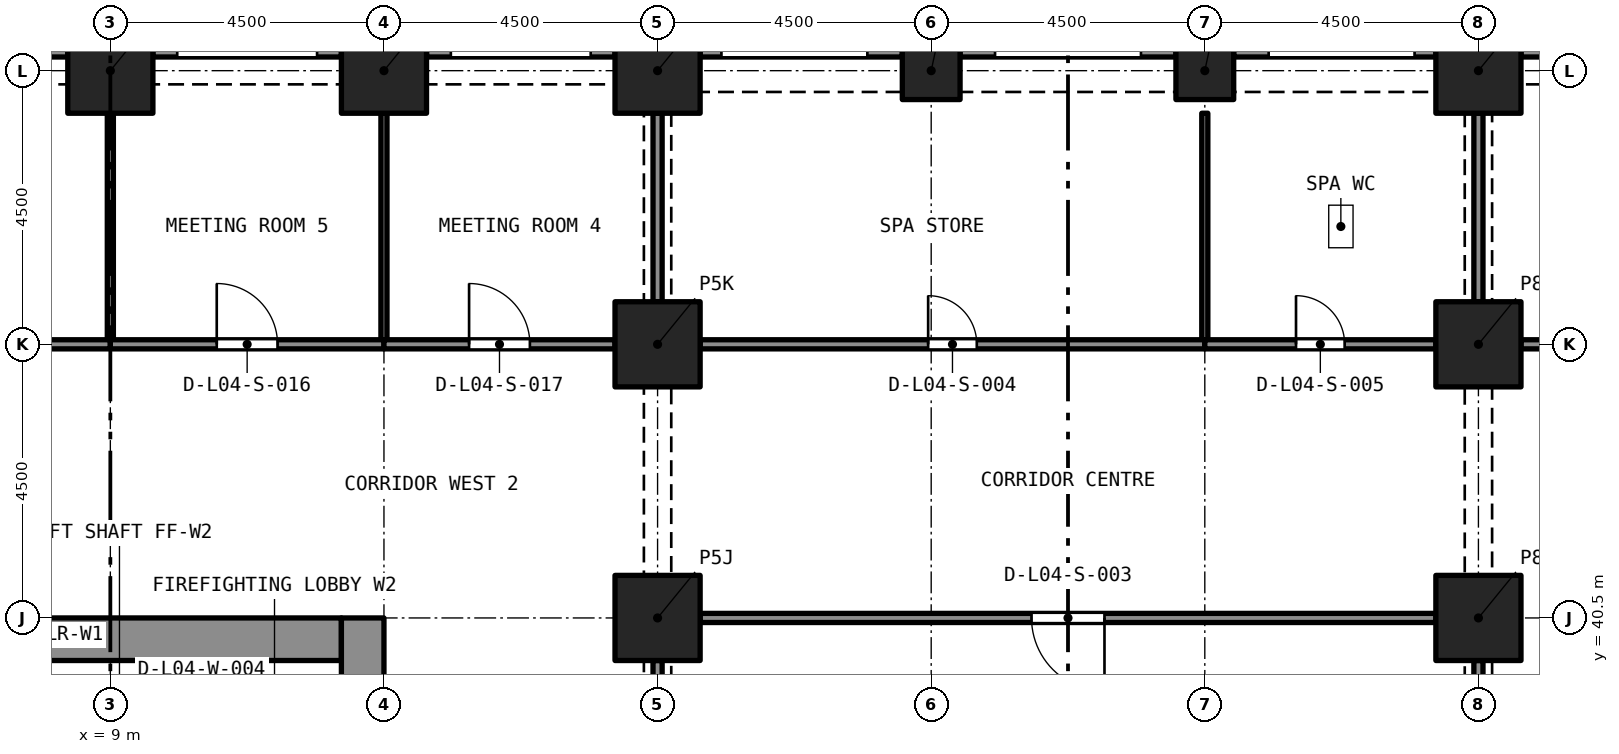
"""IFC4 building model, lengths in metres.
Left out: names, types, materials, properties, quantities, classifications, styles, units other than length and angle.
Written with IfcOpenShell. Run it as: python <this file> out.ifc"""

import sys

from ifc_helpers import new_model, si_unit, direction, frame, frame_2d, origin, origin_2d, place, context, subcontext, project, spatial, rectangle, extrude, element, fill, save


model = new_model("IFC4")
c1 = context("Model", 3, precision=1e-05, world=origin(), true_north=direction((0.0, 1.0)))
c2 = subcontext(c1, "Body", "Model", "MODEL_VIEW")
j1 = project(units=[si_unit("LENGTHUNIT", "METRE"), si_unit("PLANEANGLEUNIT", "RADIAN")], contexts=[c1])
p1 = place(None, origin())
s1 = spatial("IfcSite", under=j1, at=p1, CompositionType="ELEMENT")
p2 = place(p1, origin())
s2 = spatial("IfcBuilding", under=s1, at=p2, CompositionType="ELEMENT")
p3 = place(p2, frame((0.0, 0.0, 21.0)))
s3 = spatial("IfcBuildingStorey", under=s2, at=p3, CompositionType="ELEMENT", Elevation=21.0)
for number, where, z_axis, x_axis in (
    (1, (18.0, 40.5, 0.0), (0.0, 0.0, 1.0), (1.0, 0.0, 0.0)),
    (2, (31.5, 40.5, 0.0), (0.0, 0.0, 1.0), (1.0, 0.0, 0.0)),
    (3, (18.0, 45.0, 0.0), (0.0, 0.0, 1.0), (1.0, 0.0, 0.0)),
    (4, (31.5, 45.0, 0.0), (0.0, 0.0, 1.0), (1.0, 0.0, 0.0)),
    (5, (9.0, 49.5, 0.0), (0.0, 0.0, 1.0), (1.0, 0.0, 0.0)),
    (6, (13.5, 49.5, 0.0), (0.0, 0.0, 1.0), (1.0, 0.0, 0.0)),
    (7, (18.0, 49.5, 0.0), (0.0, 0.0, 1.0), (1.0, 0.0, 0.0)),
):
    element("IfcColumn", number, at=place(p3, frame(where, z_axis=z_axis, x_axis=x_axis)), inside=s3, PredefinedType="COLUMN", context=c2, shape_type="SweptSolid", body=[
        extrude(rectangle(XDim=1.4, YDim=1.4, at=origin_2d()), origin(), (0.0, 0.0, 1.0), 5.0),
    ])
for number, where, z_axis, x_axis in (
    (8, (22.5, 49.5, 0.0), (0.0, 0.0, 1.0), (1.0, 0.0, 0.0)),
    (9, (27.0, 49.5, 0.0), (0.0, 0.0, 1.0), (1.0, 0.0, 0.0)),
):
    element("IfcColumn", number, at=place(p3, frame(where, z_axis=z_axis, x_axis=x_axis)), inside=s3, PredefinedType="COLUMN", context=c2, shape_type="SweptSolid", body=[
        extrude(rectangle(XDim=0.95, YDim=0.95, at=origin_2d()), origin(), (0.0, 0.0, 1.0), 5.0),
    ])
p4 = place(p3, frame((31.5, 49.5, 0.0), z_axis=(0.0, 0.0, 1.0), x_axis=(1.0, 0.0, 0.0)))
e10 = element("IfcColumn", 10, at=p4, inside=s3, PredefinedType="COLUMN", context=c2, shape_type="SweptSolid", body=[
    extrude(rectangle(XDim=1.4, YDim=1.4, at=origin_2d()), origin(), (0.0, 0.0, 1.0), 5.0),
])
p5 = place(p3, frame((5.2, 40.15, 0.0), z_axis=(0.0, 0.0, 1.0), x_axis=(1.0, 0.0, 0.0)))
e11 = element("IfcWall", 11, at=p5, inside=s3, PredefinedType="SOLIDWALL", context=c2, shape_type="SweptSolid", body=[
    extrude(rectangle(XDim=7.6, YDim=0.7, at=frame_2d((3.8, 0.0))), origin(), (0.0, 0.0, 1.0), 5.0),
])
p6 = place(p3, frame((13.15, 27.0, 0.0), z_axis=(0.0, 0.0, 1.0), x_axis=(0.0, 1.0, 0.0)))
e12 = element("IfcWall", 12, at=p6, inside=s3, PredefinedType="SOLIDWALL", context=c2, shape_type="SweptSolid", body=[
    extrude(rectangle(XDim=13.5, YDim=0.7, at=frame_2d((6.75, 0.0))), origin(), (0.0, 0.0, 1.0), 5.0),
])
p7 = place(p6, frame((11.1, 0.0, 0.0)))
e13 = element("IfcOpeningElement", 13, at=p7, cuts=e12, PredefinedType="OPENING", context=c2, shape_type="SweptSolid", body=[
    extrude(rectangle(XDim=1.1, YDim=2.1, at=frame_2d((0.55, 1.05))), frame((0.0, 0.36, 0.0), z_axis=(0.0, -1.0, 0.0), x_axis=(1.0, 0.0, 0.0)), (0.0, 0.0, 1.0), 0.72),
])
p8 = place(p6, frame((8.95, 0.0, 0.0)))
e14 = element("IfcOpeningElement", 14, at=p8, cuts=e12, PredefinedType="OPENING", context=c2, shape_type="SweptSolid", body=[
    extrude(rectangle(XDim=1.2, YDim=2.1, at=frame_2d((0.6, 1.05))), frame((0.0, 0.36, 0.0), z_axis=(0.0, -1.0, 0.0), x_axis=(1.0, 0.0, 0.0)), (0.0, 0.0, 1.0), 0.72),
])
p9 = place(p3, frame((32.2, 49.875, 0.0), z_axis=(0.0, 0.0, 1.0), x_axis=(1.0, 0.0, 0.0)))
e15 = element("IfcWall", 15, at=p9, inside=s3, PredefinedType="SOLIDWALL", context=c2, shape_type="SweptSolid", body=[
    extrude(rectangle(XDim=3.1, YDim=0.3, at=frame_2d((1.55, 0.0))), origin(), (0.0, 0.0, 1.0), 5.0),
])
p10 = place(p9, frame((0.4, 0.0, 0.45)))
e16 = element("IfcOpeningElement", 16, at=p10, cuts=e15, PredefinedType="OPENING", context=c2, shape_type="SweptSolid", body=[
    extrude(rectangle(XDim=2.3, YDim=3.3, at=frame_2d((1.15, 1.65))), frame((0.0, 0.16, 0.0), z_axis=(0.0, -1.0, 0.0), x_axis=(1.0, 0.0, 0.0)), (0.0, 0.0, 1.0), 0.32),
])
p11 = place(p3, frame((27.475, 49.875, 0.0), z_axis=(0.0, 0.0, 1.0), x_axis=(1.0, 0.0, 0.0)))
e17 = element("IfcWall", 17, at=p11, inside=s3, PredefinedType="SOLIDWALL", context=c2, shape_type="SweptSolid", body=[
    extrude(rectangle(XDim=3.325, YDim=0.3, at=frame_2d((1.663, 0.0))), origin(), (0.0, 0.0, 1.0), 5.0),
])
p12 = place(p11, frame((0.575, 0.0, 0.45)))
e18 = element("IfcOpeningElement", 18, at=p12, cuts=e17, PredefinedType="OPENING", context=c2, shape_type="SweptSolid", body=[
    extrude(rectangle(XDim=2.4, YDim=3.3, at=frame_2d((1.2, 1.65))), frame((0.0, 0.16, 0.0), z_axis=(0.0, -1.0, 0.0), x_axis=(1.0, 0.0, 0.0)), (0.0, 0.0, 1.0), 0.32),
])
p13 = place(p3, frame((22.975, 49.875, 0.0), z_axis=(0.0, 0.0, 1.0), x_axis=(1.0, 0.0, 0.0)))
e19 = element("IfcWall", 19, at=p13, inside=s3, PredefinedType="SOLIDWALL", context=c2, shape_type="SweptSolid", body=[
    extrude(rectangle(XDim=3.55, YDim=0.3, at=frame_2d((1.775, 0.0))), origin(), (0.0, 0.0, 1.0), 5.0),
])
p14 = place(p13, frame((0.575, 0.0, 0.45)))
e20 = element("IfcOpeningElement", 20, at=p14, cuts=e19, PredefinedType="OPENING", context=c2, shape_type="SweptSolid", body=[
    extrude(rectangle(XDim=2.4, YDim=3.3, at=frame_2d((1.2, 1.65))), frame((0.0, 0.16, 0.0), z_axis=(0.0, -1.0, 0.0), x_axis=(1.0, 0.0, 0.0)), (0.0, 0.0, 1.0), 0.32),
])
p15 = place(p3, frame((18.7, 49.875, 0.0), z_axis=(0.0, 0.0, 1.0), x_axis=(1.0, 0.0, 0.0)))
e21 = element("IfcWall", 21, at=p15, inside=s3, PredefinedType="SOLIDWALL", context=c2, shape_type="SweptSolid", body=[
    extrude(rectangle(XDim=3.325, YDim=0.3, at=frame_2d((1.663, 0.0))), origin(), (0.0, 0.0, 1.0), 5.0),
])
p16 = place(p15, frame((0.35, 0.0, 0.45)))
e22 = element("IfcOpeningElement", 22, at=p16, cuts=e21, PredefinedType="OPENING", context=c2, shape_type="SweptSolid", body=[
    extrude(rectangle(XDim=2.4, YDim=3.3, at=frame_2d((1.2, 1.65))), frame((0.0, 0.16, 0.0), z_axis=(0.0, -1.0, 0.0), x_axis=(1.0, 0.0, 0.0)), (0.0, 0.0, 1.0), 0.32),
])
p17 = place(p3, frame((14.2, 49.875, 0.0), z_axis=(0.0, 0.0, 1.0), x_axis=(1.0, 0.0, 0.0)))
e23 = element("IfcWall", 23, at=p17, inside=s3, PredefinedType="SOLIDWALL", context=c2, shape_type="SweptSolid", body=[
    extrude(rectangle(XDim=3.1, YDim=0.3, at=frame_2d((1.55, 0.0))), origin(), (0.0, 0.0, 1.0), 5.0),
])
p18 = place(p17, frame((0.4, 0.0, 0.45)))
e24 = element("IfcOpeningElement", 24, at=p18, cuts=e23, PredefinedType="OPENING", context=c2, shape_type="SweptSolid", body=[
    extrude(rectangle(XDim=2.3, YDim=3.3, at=frame_2d((1.15, 1.65))), frame((0.0, 0.16, 0.0), z_axis=(0.0, -1.0, 0.0), x_axis=(1.0, 0.0, 0.0)), (0.0, 0.0, 1.0), 0.32),
])
p19 = place(p3, frame((9.7, 49.875, 0.0), z_axis=(0.0, 0.0, 1.0), x_axis=(1.0, 0.0, 0.0)))
e25 = element("IfcWall", 25, at=p19, inside=s3, PredefinedType="SOLIDWALL", context=c2, shape_type="SweptSolid", body=[
    extrude(rectangle(XDim=3.1, YDim=0.3, at=frame_2d((1.55, 0.0))), origin(), (0.0, 0.0, 1.0), 5.0),
])
p20 = place(p19, frame((0.4, 0.0, 0.45)))
e26 = element("IfcOpeningElement", 26, at=p20, cuts=e25, PredefinedType="OPENING", context=c2, shape_type="SweptSolid", body=[
    extrude(rectangle(XDim=2.3, YDim=3.3, at=frame_2d((1.15, 1.65))), frame((0.0, 0.16, 0.0), z_axis=(0.0, -1.0, 0.0), x_axis=(1.0, 0.0, 0.0)), (0.0, 0.0, 1.0), 0.32),
])
p21 = place(p3, frame((5.2, 49.875, 0.0), z_axis=(0.0, 0.0, 1.0), x_axis=(1.0, 0.0, 0.0)))
e27 = element("IfcWall", 27, at=p21, inside=s3, PredefinedType="SOLIDWALL", context=c2, shape_type="SweptSolid", body=[
    extrude(rectangle(XDim=3.1, YDim=0.3, at=frame_2d((1.55, 0.0))), origin(), (0.0, 0.0, 1.0), 5.0),
])
p22 = place(p21, frame((0.4, 0.0, 0.45)))
e28 = element("IfcOpeningElement", 28, at=p22, cuts=e27, PredefinedType="OPENING", context=c2, shape_type="SweptSolid", body=[
    extrude(rectangle(XDim=2.3, YDim=3.3, at=frame_2d((1.15, 1.65))), frame((0.0, 0.16, 0.0), z_axis=(0.0, -1.0, 0.0), x_axis=(1.0, 0.0, 0.0)), (0.0, 0.0, 1.0), 0.32),
])
p23 = place(p3, frame((10.5, 37.5, 0.0), z_axis=(0.0, 0.0, 1.0), x_axis=(0.0, 1.0, 0.0)))
e29 = element("IfcWall", 29, at=p23, inside=s3, PredefinedType="SOLIDWALL", context=c2, shape_type="SweptSolid", body=[
    extrude(rectangle(XDim=2.3, YDim=0.175, at=frame_2d((1.15, 0.0))), origin(), (0.0, 0.0, 1.0), 4.65),
])
p24 = place(p23, frame((0.65, 0.0, 0.0)))
e30 = element("IfcOpeningElement", 30, at=p24, cuts=e29, PredefinedType="OPENING", context=c2, shape_type="SweptSolid", body=[
    extrude(rectangle(XDim=1.0, YDim=2.1, at=frame_2d((0.5, 1.05))), frame((0.0, 0.097, 0.0), z_axis=(0.0, -1.0, 0.0), x_axis=(1.0, 0.0, 0.0)), (0.0, 0.0, 1.0), 0.195),
])
p25 = place(p3, frame((30.8, 40.5, 0.0), z_axis=(0.0, 0.0, 1.0), x_axis=(-1.0, 0.0, 0.0)))
e31 = element("IfcWall", 31, at=p25, inside=s3, PredefinedType="PARTITIONING", context=c2, shape_type="SweptSolid", body=[
    extrude(rectangle(XDim=12.1, YDim=0.15, at=frame_2d((6.05, 0.0))), origin(), (0.0, 0.0, 1.0), 4.55),
])
p26 = place(p25, frame((5.45, 0.0, 0.0)))
e32 = element("IfcOpeningElement", 32, at=p26, cuts=e31, PredefinedType="OPENING", context=c2, shape_type="SweptSolid", body=[
    extrude(rectangle(XDim=1.2, YDim=2.1, at=frame_2d((0.6, 1.05))), frame((0.0, 0.085, 0.0), z_axis=(0.0, -1.0, 0.0), x_axis=(1.0, 0.0, 0.0)), (0.0, 0.0, 1.0), 0.17),
])
for number, where, z_axis, x_axis in (
    (33, (31.5, 36.7, 0.0), (0.0, 0.0, 1.0), (0.0, 1.0, 0.0)),
    (34, (18.0, 36.7, 0.0), (0.0, 0.0, 1.0), (0.0, 1.0, 0.0)),
):
    element("IfcWall", number, at=place(p3, frame(where, z_axis=z_axis, x_axis=x_axis)), inside=s3, PredefinedType="PARTITIONING", context=c2, shape_type="SweptSolid", body=[
        extrude(rectangle(XDim=3.1, YDim=0.15, at=frame_2d((1.55, 0.0))), origin(), (0.0, 0.0, 1.0), 4.18),
    ])
p27 = place(p3, frame((27.0, 45.075, 0.0), z_axis=(0.0, 0.0, 1.0), x_axis=(0.0, 1.0, 0.0)))
e35 = element("IfcWall", 35, at=p27, inside=s3, PredefinedType="PARTITIONING", context=c2, shape_type="SweptSolid", body=[
    extrude(rectangle(XDim=3.725, YDim=0.1, at=frame_2d((1.863, 0.0))), origin(), (0.0, 0.0, 1.0), 4.55),
])
p28 = place(p3, frame((18.7, 45.0, 0.0), z_axis=(0.0, 0.0, 1.0), x_axis=(1.0, 0.0, 0.0)))
e36 = element("IfcWall", 36, at=p28, inside=s3, PredefinedType="PARTITIONING", context=c2, shape_type="SweptSolid", body=[
    extrude(rectangle(XDim=8.3, YDim=0.15, at=frame_2d((4.15, 0.0))), origin(), (0.0, 0.0, 1.0), 4.55),
])
p29 = place(p28, frame((3.75, 0.0, 0.0)))
e37 = element("IfcOpeningElement", 37, at=p29, cuts=e36, PredefinedType="OPENING", context=c2, shape_type="SweptSolid", body=[
    extrude(rectangle(XDim=0.8, YDim=2.1, at=frame_2d((0.4, 1.05))), frame((0.0, 0.085, 0.0), z_axis=(0.0, -1.0, 0.0), x_axis=(1.0, 0.0, 0.0)), (0.0, 0.0, 1.0), 0.17),
])
p30 = place(p3, frame((18.0, 45.7, 0.0), z_axis=(0.0, 0.0, 1.0), x_axis=(0.0, 1.0, 0.0)))
e38 = element("IfcWall", 38, at=p30, inside=s3, PredefinedType="PARTITIONING", context=c2, shape_type="SweptSolid", body=[
    extrude(rectangle(XDim=3.1, YDim=0.15, at=frame_2d((1.55, 0.0))), origin(), (0.0, 0.0, 1.0), 4.18),
])
p31 = place(p3, frame((27.0, 45.0, 0.0), z_axis=(0.0, 0.0, 1.0), x_axis=(1.0, 0.0, 0.0)))
e39 = element("IfcWall", 39, at=p31, inside=s3, PredefinedType="PARTITIONING", context=c2, shape_type="SweptSolid", body=[
    extrude(rectangle(XDim=3.8, YDim=0.15, at=frame_2d((1.9, 0.0))), origin(), (0.0, 0.0, 1.0), 4.55),
])
p32 = place(p31, frame((1.5, 0.0, 0.0)))
e40 = element("IfcOpeningElement", 40, at=p32, cuts=e39, PredefinedType="OPENING", context=c2, shape_type="SweptSolid", body=[
    extrude(rectangle(XDim=0.8, YDim=2.1, at=frame_2d((0.4, 1.05))), frame((0.0, 0.085, 0.0), z_axis=(0.0, -1.0, 0.0), x_axis=(1.0, 0.0, 0.0)), (0.0, 0.0, 1.0), 0.17),
])
p33 = place(p3, frame((31.5, 45.7, 0.0), z_axis=(0.0, 0.0, 1.0), x_axis=(0.0, 1.0, 0.0)))
e41 = element("IfcWall", 41, at=p33, inside=s3, PredefinedType="PARTITIONING", context=c2, shape_type="SweptSolid", body=[
    extrude(rectangle(XDim=3.1, YDim=0.15, at=frame_2d((1.55, 0.0))), origin(), (0.0, 0.0, 1.0), 4.18),
])
p34 = place(p3, frame((32.2, 45.0, 0.0), z_axis=(0.0, 0.0, 1.0), x_axis=(1.0, 0.0, 0.0)))
e42 = element("IfcWall", 42, at=p34, inside=s3, PredefinedType="PARTITIONING", context=c2, shape_type="SweptSolid", body=[
    extrude(rectangle(XDim=8.3, YDim=0.15, at=frame_2d((4.15, 0.0))), origin(), (0.0, 0.0, 1.0), 4.65),
])
p35 = place(p34, frame((3.65, 0.0, 0.0)))
e43 = element("IfcOpeningElement", 43, at=p35, cuts=e42, PredefinedType="OPENING", context=c2, shape_type="SweptSolid", body=[
    extrude(rectangle(XDim=1.0, YDim=2.1, at=frame_2d((0.5, 1.05))), frame((0.0, 0.085, 0.0), z_axis=(0.0, -1.0, 0.0), x_axis=(1.0, 0.0, 0.0)), (0.0, 0.0, 1.0), 0.17),
])
p36 = place(p3, frame((9.0, 45.075, 0.0), z_axis=(0.0, 0.0, 1.0), x_axis=(0.0, 1.0, 0.0)))
e44 = element("IfcWall", 44, at=p36, inside=s3, PredefinedType="PARTITIONING", context=c2, shape_type="SweptSolid", body=[
    extrude(rectangle(XDim=3.725, YDim=0.1, at=frame_2d((1.863, 0.0))), origin(), (0.0, 0.0, 1.0), 4.65),
])
p37 = place(p3, frame((0.758, 45.0, 0.0), z_axis=(0.0, 0.0, 1.0), x_axis=(1.0, 0.0, 0.0)))
e45 = element("IfcWall", 45, at=p37, inside=s3, PredefinedType="PARTITIONING", context=c2, shape_type="SweptSolid", body=[
    extrude(rectangle(XDim=8.242, YDim=0.15, at=frame_2d((4.121, 0.0))), origin(), (0.0, 0.0, 1.0), 4.65),
])
p38 = place(p37, frame((3.621, 0.0, 0.0)))
e46 = element("IfcOpeningElement", 46, at=p38, cuts=e45, PredefinedType="OPENING", context=c2, shape_type="SweptSolid", body=[
    extrude(rectangle(XDim=1.0, YDim=2.1, at=frame_2d((0.5, 1.05))), frame((0.0, 0.085, 0.0), z_axis=(0.0, -1.0, 0.0), x_axis=(1.0, 0.0, 0.0)), (0.0, 0.0, 1.0), 0.17),
])
p39 = place(p3, frame((13.5, 45.075, 0.0), z_axis=(0.0, 0.0, 1.0), x_axis=(0.0, 1.0, 0.0)))
e47 = element("IfcWall", 47, at=p39, inside=s3, PredefinedType="PARTITIONING", context=c2, shape_type="SweptSolid", body=[
    extrude(rectangle(XDim=3.725, YDim=0.1, at=frame_2d((1.863, 0.0))), origin(), (0.0, 0.0, 1.0), 4.65),
])
p40 = place(p3, frame((9.0, 45.0, 0.0), z_axis=(0.0, 0.0, 1.0), x_axis=(1.0, 0.0, 0.0)))
e48 = element("IfcWall", 48, at=p40, inside=s3, PredefinedType="PARTITIONING", context=c2, shape_type="SweptSolid", body=[
    extrude(rectangle(XDim=4.5, YDim=0.15, at=frame_2d((2.25, 0.0))), origin(), (0.0, 0.0, 1.0), 4.65),
])
p41 = place(p40, frame((1.75, 0.0, 0.0)))
e49 = element("IfcOpeningElement", 49, at=p41, cuts=e48, PredefinedType="OPENING", context=c2, shape_type="SweptSolid", body=[
    extrude(rectangle(XDim=1.0, YDim=2.1, at=frame_2d((0.5, 1.05))), frame((0.0, 0.085, 0.0), z_axis=(0.0, -1.0, 0.0), x_axis=(1.0, 0.0, 0.0)), (0.0, 0.0, 1.0), 0.17),
])
p42 = place(p3, frame((13.5, 45.0, 0.0), z_axis=(0.0, 0.0, 1.0), x_axis=(1.0, 0.0, 0.0)))
e50 = element("IfcWall", 50, at=p42, inside=s3, PredefinedType="PARTITIONING", context=c2, shape_type="SweptSolid", body=[
    extrude(rectangle(XDim=3.8, YDim=0.15, at=frame_2d((1.9, 0.0))), origin(), (0.0, 0.0, 1.0), 4.65),
])
p43 = place(p42, frame((1.4, 0.0, 0.0)))
e51 = element("IfcOpeningElement", 51, at=p43, cuts=e50, PredefinedType="OPENING", context=c2, shape_type="SweptSolid", body=[
    extrude(rectangle(XDim=1.0, YDim=2.1, at=frame_2d((0.5, 1.05))), frame((0.0, 0.085, 0.0), z_axis=(0.0, -1.0, 0.0), x_axis=(1.0, 0.0, 0.0)), (0.0, 0.0, 1.0), 0.17),
])
p44 = place(p26, origin())
e52 = element("IfcDoor", 52, at=p44, inside=s3, OperationType="SINGLE_SWING_RIGHT", PredefinedType="DOOR", context=c2, shape_type="SweptSolid", body=[
    extrude(rectangle(XDim=1.2, YDim=2.1, at=frame_2d((0.6, 1.05))), frame((0.0, 0.025, 0.0), z_axis=(0.0, -1.0, 0.0), x_axis=(1.0, 0.0, 0.0)), (0.0, 0.0, 1.0), 0.05),
])
fill(e32, e52)
p45 = place(p29, origin())
e53 = element("IfcDoor", 53, at=p45, inside=s3, OperationType="SINGLE_SWING_LEFT", PredefinedType="DOOR", context=c2, shape_type="SweptSolid", body=[
    extrude(rectangle(XDim=0.8, YDim=2.1, at=frame_2d((0.4, 1.05))), frame((0.0, 0.025, 0.0), z_axis=(0.0, -1.0, 0.0), x_axis=(1.0, 0.0, 0.0)), (0.0, 0.0, 1.0), 0.05),
])
fill(e37, e53)
p46 = place(p32, origin())
e54 = element("IfcDoor", 54, at=p46, inside=s3, OperationType="SINGLE_SWING_RIGHT", PredefinedType="DOOR", context=c2, shape_type="SweptSolid", body=[
    extrude(rectangle(XDim=0.8, YDim=2.1, at=frame_2d((0.4, 1.05))), frame((0.0, 0.025, 0.0), z_axis=(0.0, -1.0, 0.0), x_axis=(1.0, 0.0, 0.0)), (0.0, 0.0, 1.0), 0.05),
])
fill(e40, e54)
p47 = place(p41, origin())
e55 = element("IfcDoor", 55, at=p47, inside=s3, OperationType="SINGLE_SWING_RIGHT", PredefinedType="DOOR", context=c2, shape_type="SweptSolid", body=[
    extrude(rectangle(XDim=1.0, YDim=2.1, at=frame_2d((0.5, 1.05))), frame((0.0, 0.025, 0.0), z_axis=(0.0, -1.0, 0.0), x_axis=(1.0, 0.0, 0.0)), (0.0, 0.0, 1.0), 0.05),
])
fill(e49, e55)
p48 = place(p43, origin())
e56 = element("IfcDoor", 56, at=p48, inside=s3, OperationType="SINGLE_SWING_RIGHT", PredefinedType="DOOR", context=c2, shape_type="SweptSolid", body=[
    extrude(rectangle(XDim=1.0, YDim=2.1, at=frame_2d((0.5, 1.05))), frame((0.0, 0.025, 0.0), z_axis=(0.0, -1.0, 0.0), x_axis=(1.0, 0.0, 0.0)), (0.0, 0.0, 1.0), 0.05),
])
fill(e51, e56)
save(model, sys.argv[1])
